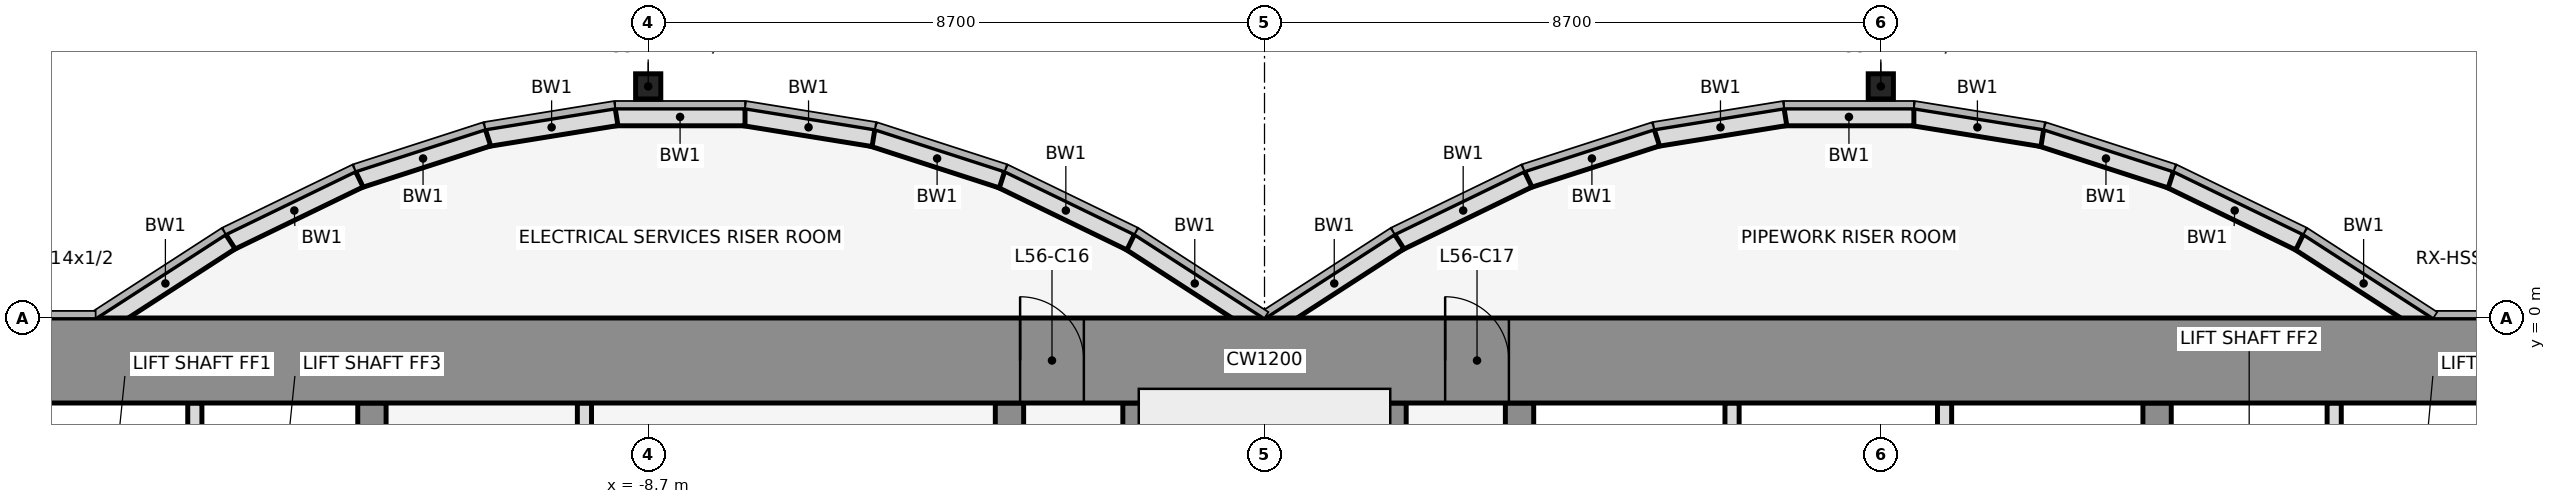
"""IFC4 building model, lengths in metres.
Left out: names, types, materials, properties, quantities, classifications, styles, units other than length and angle.
Written with IfcOpenShell. Run it as: python <this file> out.ifc"""

import sys

from ifc_helpers import new_model, si_unit, direction, frame, frame_2d, origin, origin_2d, place, context, subcontext, project, spatial, rectangle, hollow_rectangle, extrude, element, fill, save


model = new_model("IFC4")
c1 = context("Model", 3, precision=1e-05, world=origin(), true_north=direction((0.0, 1.0)))
c2 = subcontext(c1, "Body", "Model", "MODEL_VIEW")
j1 = project(units=[si_unit("LENGTHUNIT", "METRE"), si_unit("PLANEANGLEUNIT", "RADIAN")], contexts=[c1])
p1 = place(None, origin())
s1 = spatial("IfcSite", under=j1, at=p1, CompositionType="ELEMENT")
p2 = place(p1, origin())
s2 = spatial("IfcBuilding", under=s1, at=p2, CompositionType="ELEMENT")
p3 = place(p2, frame((0.0, 0.0, 249.8)))
s3 = spatial("IfcBuildingStorey", under=s2, at=p3, CompositionType="ELEMENT", Elevation=249.8)
for number, where, z_axis, x_axis in (
    (1, (-8.7, 3.269, 0.0), (0.0, 0.0, 1.0), (1.0, 0.0, 0.0)),
    (2, (8.7, 3.269, 0.0), (0.0, 0.0, 1.0), (1.0, 0.0, 0.0)),
):
    element("IfcColumn", number, at=place(p3, frame(where, z_axis=z_axis, x_axis=x_axis)), inside=s3, PredefinedType="COLUMN", context=c2, shape_type="SweptSolid", body=[
        extrude(hollow_rectangle(XDim=0.356, YDim=0.356, WallThickness=0.012, at=origin_2d()), origin(), (0.0, 0.0, 1.0), 4.2),
    ])
p4 = place(p3, frame((16.432, -0.105, 0.0), z_axis=(0.0, 0.0, 1.0), x_axis=(-0.83981312244, 0.542875602121, 0.0)))
e3 = element("IfcWall", 3, at=p4, inside=s3, PredefinedType="STANDARD", context=c2, shape_type="SweptSolid", body=[
    extrude(rectangle(XDim=2.183, YDim=0.25, at=frame_2d((1.091, 0.0))), origin(), (0.0, 0.0, 1.0), 4.05),
])
p5 = place(p3, frame((14.612, 1.073, 0.0), z_axis=(0.0, 0.0, 1.0), x_axis=(-0.89982408427, 0.436252928206, 0.0)))
e4 = element("IfcWall", 4, at=p5, inside=s3, PredefinedType="STANDARD", context=c2, shape_type="SweptSolid", body=[
    extrude(rectangle(XDim=2.038, YDim=0.25, at=frame_2d((1.019, 0.0))), origin(), (0.0, 0.0, 1.0), 4.05),
])
p6 = place(p3, frame((12.795, 1.955, 0.0), z_axis=(0.0, 0.0, 1.0), x_axis=(-0.951495806175, 0.307661714928, 0.0)))
e5 = element("IfcWall", 5, at=p6, inside=s3, PredefinedType="STANDARD", context=c2, shape_type="SweptSolid", body=[
    extrude(rectangle(XDim=1.927, YDim=0.25, at=frame_2d((0.963, 0.0))), origin(), (0.0, 0.0, 1.0), 4.05),
])
p7 = place(p3, frame((10.98, 2.543, 0.0), z_axis=(0.0, 0.0, 1.0), x_axis=(-0.987181718931, 0.159600293885, 0.0)))
e6 = element("IfcWall", 6, at=p7, inside=s3, PredefinedType="STANDARD", context=c2, shape_type="SweptSolid", body=[
    extrude(rectangle(XDim=1.857, YDim=0.25, at=frame_2d((0.929, 0.0))), origin(), (0.0, 0.0, 1.0), 4.05),
])
p8 = place(p3, frame((9.167, 2.838, 0.0), z_axis=(0.0, 0.0, 1.0), x_axis=(-1.0, 0.0, 0.0)))
e7 = element("IfcWall", 7, at=p8, inside=s3, PredefinedType="STANDARD", context=c2, shape_type="SweptSolid", body=[
    extrude(rectangle(XDim=1.833, YDim=0.25, at=frame_2d((0.917, 0.0))), origin(), (0.0, 0.0, 1.0), 4.05),
])
p9 = place(p3, frame((7.353, 2.84, 0.0), z_axis=(0.0, 0.0, 1.0), x_axis=(-0.987181718931, -0.159600293885, 0.0)))
e8 = element("IfcWall", 8, at=p9, inside=s3, PredefinedType="STANDARD", context=c2, shape_type="SweptSolid", body=[
    extrude(rectangle(XDim=1.857, YDim=0.25, at=frame_2d((0.929, 0.0))), origin(), (0.0, 0.0, 1.0), 4.05),
])
p10 = place(p3, frame((5.538, 2.548, 0.0), z_axis=(0.0, 0.0, 1.0), x_axis=(-0.951495806175, -0.307661714928, 0.0)))
e9 = element("IfcWall", 9, at=p10, inside=s3, PredefinedType="STANDARD", context=c2, shape_type="SweptSolid", body=[
    extrude(rectangle(XDim=1.927, YDim=0.25, at=frame_2d((0.963, 0.0))), origin(), (0.0, 0.0, 1.0), 4.05),
])
p11 = place(p3, frame((3.721, 1.962, 0.0), z_axis=(0.0, 0.0, 1.0), x_axis=(-0.89982408427, -0.436252928206, 0.0)))
e10 = element("IfcWall", 10, at=p11, inside=s3, PredefinedType="STANDARD", context=c2, shape_type="SweptSolid", body=[
    extrude(rectangle(XDim=2.038, YDim=0.25, at=frame_2d((1.019, 0.0))), origin(), (0.0, 0.0, 1.0), 4.05),
])
for number, where, z_axis, x_axis in (
    (11, (1.901, 1.08, 0.0), (0.0, 0.0, 1.0), (-0.84, -0.543, 0.0)),
    (12, (-0.068, -0.105, 0.0), (0.0, 0.0, 1.0), (-0.84, 0.543, 0.0)),
):
    element("IfcWall", number, at=place(p3, frame(where, z_axis=z_axis, x_axis=x_axis)), inside=s3, PredefinedType="STANDARD", context=c2, shape_type="SweptSolid", body=[
        extrude(rectangle(XDim=2.183, YDim=0.25, at=frame_2d((1.091, 0.0))), origin(), (0.0, 0.0, 1.0), 4.05),
    ])
p12 = place(p3, frame((-1.888, 1.073, 0.0), z_axis=(0.0, 0.0, 1.0), x_axis=(-0.89982408427, 0.436252928206, 0.0)))
e13 = element("IfcWall", 13, at=p12, inside=s3, PredefinedType="STANDARD", context=c2, shape_type="SweptSolid", body=[
    extrude(rectangle(XDim=2.038, YDim=0.25, at=frame_2d((1.019, 0.0))), origin(), (0.0, 0.0, 1.0), 4.05),
])
p13 = place(p3, frame((-3.705, 1.955, 0.0), z_axis=(0.0, 0.0, 1.0), x_axis=(-0.951495806175, 0.307661714928, 0.0)))
e14 = element("IfcWall", 14, at=p13, inside=s3, PredefinedType="STANDARD", context=c2, shape_type="SweptSolid", body=[
    extrude(rectangle(XDim=1.927, YDim=0.25, at=frame_2d((0.963, 0.0))), origin(), (0.0, 0.0, 1.0), 4.05),
])
p14 = place(p3, frame((-5.52, 2.543, 0.0), z_axis=(0.0, 0.0, 1.0), x_axis=(-0.987181718931, 0.159600293885, 0.0)))
e15 = element("IfcWall", 15, at=p14, inside=s3, PredefinedType="STANDARD", context=c2, shape_type="SweptSolid", body=[
    extrude(rectangle(XDim=1.857, YDim=0.25, at=frame_2d((0.929, 0.0))), origin(), (0.0, 0.0, 1.0), 4.05),
])
p15 = place(p3, frame((-7.333, 2.838, 0.0), z_axis=(0.0, 0.0, 1.0), x_axis=(-1.0, 0.0, 0.0)))
e16 = element("IfcWall", 16, at=p15, inside=s3, PredefinedType="STANDARD", context=c2, shape_type="SweptSolid", body=[
    extrude(rectangle(XDim=1.833, YDim=0.25, at=frame_2d((0.917, 0.0))), origin(), (0.0, 0.0, 1.0), 4.05),
])
p16 = place(p3, frame((-9.147, 2.84, 0.0), z_axis=(0.0, 0.0, 1.0), x_axis=(-0.987181718931, -0.159600293885, 0.0)))
e17 = element("IfcWall", 17, at=p16, inside=s3, PredefinedType="STANDARD", context=c2, shape_type="SweptSolid", body=[
    extrude(rectangle(XDim=1.857, YDim=0.25, at=frame_2d((0.929, 0.0))), origin(), (0.0, 0.0, 1.0), 4.05),
])
p17 = place(p3, frame((-10.962, 2.548, 0.0), z_axis=(0.0, 0.0, 1.0), x_axis=(-0.951495806175, -0.307661714928, 0.0)))
e18 = element("IfcWall", 18, at=p17, inside=s3, PredefinedType="STANDARD", context=c2, shape_type="SweptSolid", body=[
    extrude(rectangle(XDim=1.927, YDim=0.25, at=frame_2d((0.963, 0.0))), origin(), (0.0, 0.0, 1.0), 4.05),
])
p18 = place(p3, frame((-12.779, 1.962, 0.0), z_axis=(0.0, 0.0, 1.0), x_axis=(-0.89982408427, -0.436252928206, 0.0)))
e19 = element("IfcWall", 19, at=p18, inside=s3, PredefinedType="STANDARD", context=c2, shape_type="SweptSolid", body=[
    extrude(rectangle(XDim=2.038, YDim=0.25, at=frame_2d((1.019, 0.0))), origin(), (0.0, 0.0, 1.0), 4.05),
])
p19 = place(p3, frame((-14.599, 1.08, 0.0), z_axis=(0.0, 0.0, 1.0), x_axis=(-0.83981312244, -0.542875602121, 0.0)))
e20 = element("IfcWall", 20, at=p19, inside=s3, PredefinedType="STANDARD", context=c2, shape_type="SweptSolid", body=[
    extrude(rectangle(XDim=2.183, YDim=0.25, at=frame_2d((1.091, 0.0))), origin(), (0.0, 0.0, 1.0), 4.05),
])
p20 = place(p3, frame((-15.1, -4.6, 0.0), z_axis=(0.0, 0.0, 1.0), x_axis=(0.0, 1.0, 0.0)))
e21 = element("IfcWall", 21, at=p20, inside=s3, PredefinedType="PARTITIONING", context=c2, shape_type="SweptSolid", body=[
    extrude(rectangle(XDim=3.4, YDim=0.2, at=frame_2d((1.7, 0.0))), origin(), (0.0, 0.0, 1.0), 3.039),
])
p21 = place(p3, frame((-12.6, -11.8, 0.0), z_axis=(0.0, 0.0, 1.0), x_axis=(0.0, 1.0, 0.0)))
e22 = element("IfcWall", 22, at=p21, inside=s3, PredefinedType="SHEAR", context=c2, shape_type="SweptSolid", body=[
    extrude(rectangle(XDim=10.6, YDim=0.4, at=frame_2d((5.3, 0.0))), origin(), (0.0, 0.0, 1.0), 4.2),
])
p22 = place(p21, frame((4.75, 0.0, 0.0)))
e23 = element("IfcOpeningElement", 23, at=p22, cuts=e22, PredefinedType="OPENING", context=c2, shape_type="SweptSolid", body=[
    extrude(rectangle(XDim=1.1, YDim=2.1, at=frame_2d((0.55, 1.05))), frame((0.0, 0.212, 0.0), z_axis=(0.0, -1.0, 0.0), x_axis=(1.0, 0.0, 0.0)), (0.0, 0.0, 1.0), 0.424),
])
p23 = place(p3, frame((-9.6, -4.6, 0.0), z_axis=(0.0, 0.0, 1.0), x_axis=(0.0, 1.0, 0.0)))
e24 = element("IfcWall", 24, at=p23, inside=s3, PredefinedType="PARTITIONING", context=c2, shape_type="SweptSolid", body=[
    extrude(rectangle(XDim=3.4, YDim=0.2, at=frame_2d((1.7, 0.0))), origin(), (0.0, 0.0, 1.0), 3.039),
])
p24 = place(p3, frame((-3.6, -11.8, 0.0), z_axis=(0.0, 0.0, 1.0), x_axis=(0.0, 1.0, 0.0)))
e25 = element("IfcWall", 25, at=p24, inside=s3, PredefinedType="SHEAR", context=c2, shape_type="SweptSolid", body=[
    extrude(rectangle(XDim=10.6, YDim=0.4, at=frame_2d((5.3, 0.0))), origin(), (0.0, 0.0, 1.0), 4.2),
])
p25 = place(p24, frame((4.85, 0.0, 0.0)))
e26 = element("IfcOpeningElement", 26, at=p25, cuts=e25, PredefinedType="OPENING", context=c2, shape_type="SweptSolid", body=[
    extrude(rectangle(XDim=0.9, YDim=2.1, at=frame_2d((0.45, 1.05))), frame((0.0, 0.212, 0.0), z_axis=(0.0, -1.0, 0.0), x_axis=(1.0, 0.0, 0.0)), (0.0, 0.0, 1.0), 0.424),
])
for number, where, z_axis, x_axis in (
    (27, (-1.8, -11.8, 0.0), (0.0, 0.0, 1.0), (0.0, 1.0, 0.0)),
    (28, (1.8, -11.8, 0.0), (0.0, 0.0, 1.0), (0.0, 1.0, 0.0)),
):
    element("IfcWall", number, at=place(p3, frame(where, z_axis=z_axis, x_axis=x_axis)), inside=s3, PredefinedType="SHEAR", context=c2, shape_type="SweptSolid", body=[
        extrude(rectangle(XDim=10.6, YDim=0.4, at=frame_2d((5.3, 0.0))), origin(), (0.0, 0.0, 1.0), 4.2),
    ])
p26 = place(p3, frame((3.6, -11.8, 0.0), z_axis=(0.0, 0.0, 1.0), x_axis=(0.0, 1.0, 0.0)))
e29 = element("IfcWall", 29, at=p26, inside=s3, PredefinedType="SHEAR", context=c2, shape_type="SweptSolid", body=[
    extrude(rectangle(XDim=10.6, YDim=0.4, at=frame_2d((5.3, 0.0))), origin(), (0.0, 0.0, 1.0), 4.2),
])
p27 = place(p26, frame((1.35, 0.0, 0.0)))
e30 = element("IfcOpeningElement", 30, at=p27, cuts=e29, PredefinedType="OPENING", context=c2, shape_type="SweptSolid", body=[
    extrude(rectangle(XDim=0.9, YDim=2.1, at=frame_2d((0.45, 1.05))), frame((0.0, 0.212, 0.0), z_axis=(0.0, -1.0, 0.0), x_axis=(1.0, 0.0, 0.0)), (0.0, 0.0, 1.0), 0.424),
])
for number, where, z_axis, x_axis in (
    (31, (6.6, -4.6, 0.0), (0.0, 0.0, 1.0), (0.0, 1.0, 0.0)),
    (32, (9.6, -4.6, 0.0), (0.0, 0.0, 1.0), (0.0, 1.0, 0.0)),
):
    element("IfcWall", number, at=place(p3, frame(where, z_axis=z_axis, x_axis=x_axis)), inside=s3, PredefinedType="PARTITIONING", context=c2, shape_type="SweptSolid", body=[
        extrude(rectangle(XDim=3.4, YDim=0.2, at=frame_2d((1.7, 0.0))), origin(), (0.0, 0.0, 1.0), 3.039),
    ])
p28 = place(p3, frame((12.6, -11.8, 0.0), z_axis=(0.0, 0.0, 1.0), x_axis=(0.0, 1.0, 0.0)))
e33 = element("IfcWall", 33, at=p28, inside=s3, PredefinedType="SHEAR", context=c2, shape_type="SweptSolid", body=[
    extrude(rectangle(XDim=10.6, YDim=0.4, at=frame_2d((5.3, 0.0))), origin(), (0.0, 0.0, 1.0), 4.2),
])
p29 = place(p28, frame((4.75, 0.0, 0.0)))
e34 = element("IfcOpeningElement", 34, at=p29, cuts=e33, PredefinedType="OPENING", context=c2, shape_type="SweptSolid", body=[
    extrude(rectangle(XDim=1.1, YDim=2.1, at=frame_2d((0.55, 1.05))), frame((0.0, 0.212, 0.0), z_axis=(0.0, -1.0, 0.0), x_axis=(1.0, 0.0, 0.0)), (0.0, 0.0, 1.0), 0.424),
])
p30 = place(p3, frame((15.1, -4.6, 0.0), z_axis=(0.0, 0.0, 1.0), x_axis=(0.0, 1.0, 0.0)))
e35 = element("IfcWall", 35, at=p30, inside=s3, PredefinedType="PARTITIONING", context=c2, shape_type="SweptSolid", body=[
    extrude(rectangle(XDim=3.4, YDim=0.2, at=frame_2d((1.7, 0.0))), origin(), (0.0, 0.0, 1.0), 3.039),
])
p31 = place(p3, frame((-22.0, -0.6, 0.0), z_axis=(0.0, 0.0, 1.0), x_axis=(1.0, 0.0, 0.0)))
e36 = element("IfcWall", 36, at=p31, inside=s3, PredefinedType="SHEAR", context=c2, shape_type="SweptSolid", body=[
    extrude(rectangle(XDim=44.0, YDim=1.2, at=frame_2d((22.0, 0.0))), origin(), (0.0, 0.0, 1.0), 4.2),
])
p32 = place(p31, frame((18.55, 0.0, 0.0)))
e37 = element("IfcOpeningElement", 37, at=p32, cuts=e36, PredefinedType="OPENING", context=c2, shape_type="SweptSolid", body=[
    extrude(rectangle(XDim=0.9, YDim=2.1, at=frame_2d((0.45, 1.05))), frame((0.0, 0.612, 0.0), z_axis=(0.0, -1.0, 0.0), x_axis=(1.0, 0.0, 0.0)), (0.0, 0.0, 1.0), 1.224),
])
p33 = place(p31, frame((24.55, 0.0, 0.0)))
e38 = element("IfcOpeningElement", 38, at=p33, cuts=e36, PredefinedType="OPENING", context=c2, shape_type="SweptSolid", body=[
    extrude(rectangle(XDim=0.9, YDim=2.1, at=frame_2d((0.45, 1.05))), frame((0.0, 0.612, 0.0), z_axis=(0.0, -1.0, 0.0), x_axis=(1.0, 0.0, 0.0)), (0.0, 0.0, 1.0), 1.224),
])
p34 = place(p32, origin())
e39 = element("IfcDoor", 39, at=p34, inside=s3, OperationType="SINGLE_SWING_LEFT", PredefinedType="DOOR", context=c2, shape_type="SweptSolid", body=[
    extrude(rectangle(XDim=0.9, YDim=2.1, at=frame_2d((0.45, 1.05))), frame((0.0, 0.025, 0.0), z_axis=(0.0, -1.0, 0.0), x_axis=(1.0, 0.0, 0.0)), (0.0, 0.0, 1.0), 0.05),
])
fill(e37, e39)
p35 = place(p33, origin())
e40 = element("IfcDoor", 40, at=p35, inside=s3, OperationType="SINGLE_SWING_LEFT", PredefinedType="DOOR", context=c2, shape_type="SweptSolid", body=[
    extrude(rectangle(XDim=0.9, YDim=2.1, at=frame_2d((0.45, 1.05))), frame((0.0, 0.025, 0.0), z_axis=(0.0, -1.0, 0.0), x_axis=(1.0, 0.0, 0.0)), (0.0, 0.0, 1.0), 0.05),
])
fill(e38, e40)
save(model, sys.argv[1])
